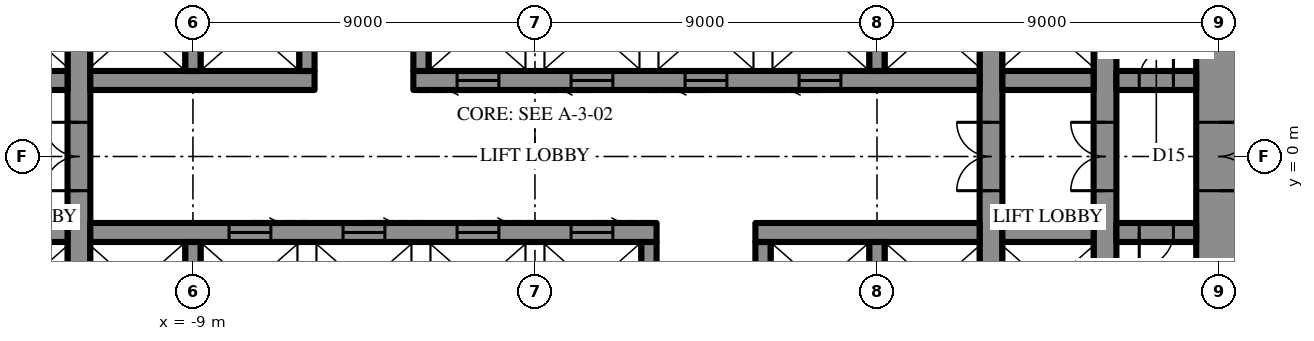
"""IFC4 building model, lengths in metres.
Left out: names, types, materials, properties, quantities, classifications, styles, units other than length and angle.
Written with IfcOpenShell. Run it as: python <this file> out.ifc"""

import sys

from ifc_helpers import new_model, si_unit, direction, frame, frame_2d, origin, place, context, subcontext, project, spatial, rectangle, extrude, element, fill, save


model = new_model("IFC4")
c1 = context("Model", 3, precision=1e-05, world=origin(), true_north=direction((0.0, 1.0)))
c2 = subcontext(c1, "Body", "Model", "MODEL_VIEW")
j1 = project(units=[si_unit("LENGTHUNIT", "METRE"), si_unit("PLANEANGLEUNIT", "RADIAN")], contexts=[c1])
p1 = place(None, origin())
s1 = spatial("IfcSite", under=j1, at=p1, CompositionType="ELEMENT")
p2 = place(p1, origin())
s2 = spatial("IfcBuilding", under=s1, at=p2, CompositionType="ELEMENT")
p3 = place(p2, frame((0.0, 0.0, 132.1)))
s3 = spatial("IfcBuildingStorey", under=s2, at=p3, CompositionType="ELEMENT", Elevation=132.1)
p4 = place(p3, frame((18.0, -10.7, 0.0), z_axis=(0.0, 0.0, 1.0), x_axis=(0.0, 1.0, 0.0)))
e1 = element("IfcWall", 1, at=p4, inside=s3, PredefinedType="SHEAR", context=c2, shape_type="SweptSolid", body=[
    extrude(rectangle(XDim=21.4, YDim=1.2, at=frame_2d((10.7, 0.0))), origin(), (0.0, 0.0, 1.0), 4.2),
])
p5 = place(p4, frame((9.8, 0.0, 0.0)))
e2 = element("IfcOpeningElement", 2, at=p5, cuts=e1, PredefinedType="OPENING", context=c2, shape_type="SweptSolid", body=[
    extrude(rectangle(XDim=1.8, YDim=2.4, at=frame_2d((0.9, 1.2))), frame((0.0, 0.61, 0.0), z_axis=(0.0, -1.0, 0.0), x_axis=(1.0, 0.0, 0.0)), (0.0, 0.0, 1.0), 1.22),
])
p6 = place(p3, frame((12.0, -10.7, 0.0), z_axis=(0.0, 0.0, 1.0), x_axis=(0.0, 1.0, 0.0)))
e3 = element("IfcWall", 3, at=p6, inside=s3, PredefinedType="SHEAR", context=c2, shape_type="SweptSolid", body=[
    extrude(rectangle(XDim=21.4, YDim=0.6, at=frame_2d((10.7, 0.0))), origin(), (0.0, 0.0, 1.0), 4.2),
])
p7 = place(p6, frame((9.8, 0.0, 0.0)))
e4 = element("IfcOpeningElement", 4, at=p7, cuts=e3, PredefinedType="OPENING", context=c2, shape_type="SweptSolid", body=[
    extrude(rectangle(XDim=1.8, YDim=2.4, at=frame_2d((0.9, 1.2))), frame((0.0, 0.31, 0.0), z_axis=(0.0, -1.0, 0.0), x_axis=(1.0, 0.0, 0.0)), (0.0, 0.0, 1.0), 0.62),
])
p8 = place(p3, frame((-12.0, -10.7, 0.0), z_axis=(0.0, 0.0, 1.0), x_axis=(0.0, 1.0, 0.0)))
e5 = element("IfcWall", 5, at=p8, inside=s3, PredefinedType="SHEAR", context=c2, shape_type="SweptSolid", body=[
    extrude(rectangle(XDim=21.4, YDim=0.6, at=frame_2d((10.7, 0.0))), origin(), (0.0, 0.0, 1.0), 4.2),
])
p9 = place(p8, frame((9.8, 0.0, 0.0)))
e6 = element("IfcOpeningElement", 6, at=p9, cuts=e5, PredefinedType="OPENING", context=c2, shape_type="SweptSolid", body=[
    extrude(rectangle(XDim=1.8, YDim=2.4, at=frame_2d((0.9, 1.2))), frame((0.0, 0.31, 0.0), z_axis=(0.0, -1.0, 0.0), x_axis=(1.0, 0.0, 0.0)), (0.0, 0.0, 1.0), 0.62),
])
p10 = place(p3, frame((15.0, -10.7, 0.0), z_axis=(0.0, 0.0, 1.0), x_axis=(0.0, 1.0, 0.0)))
e7 = element("IfcWall", 7, at=p10, inside=s3, PredefinedType="SHEAR", context=c2, shape_type="SweptSolid", body=[
    extrude(rectangle(XDim=21.4, YDim=0.6, at=frame_2d((10.7, 0.0))), origin(), (0.0, 0.0, 1.0), 4.2),
])
p11 = place(p10, frame((9.8, 0.0, 0.0)))
e8 = element("IfcOpeningElement", 8, at=p11, cuts=e7, PredefinedType="OPENING", context=c2, shape_type="SweptSolid", body=[
    extrude(rectangle(XDim=1.8, YDim=2.4, at=frame_2d((0.9, 1.2))), frame((0.0, 0.31, 0.0), z_axis=(0.0, -1.0, 0.0), x_axis=(1.0, 0.0, 0.0)), (0.0, 0.0, 1.0), 0.62),
])
p12 = place(p3, frame((-14.7, 2.0, 0.0), z_axis=(0.0, 0.0, 1.0), x_axis=(1.0, 0.0, 0.0)))
e9 = element("IfcWall", 9, at=p12, inside=s3, PredefinedType="SHEAR", context=c2, shape_type="SweptSolid", body=[
    extrude(rectangle(XDim=2.4, YDim=0.5, at=frame_2d((1.2, 0.0))), origin(), (0.0, 0.0, 1.0), 4.2),
])
p13 = place(p3, frame((-11.7, 2.0, 0.0), z_axis=(0.0, 0.0, 1.0), x_axis=(1.0, 0.0, 0.0)))
e10 = element("IfcWall", 10, at=p13, inside=s3, PredefinedType="SHEAR", context=c2, shape_type="SweptSolid", body=[
    extrude(rectangle(XDim=5.9, YDim=0.5, at=frame_2d((2.95, 0.0))), origin(), (0.0, 0.0, 1.0), 4.2),
])
p14 = place(p3, frame((-3.2, 2.0, 0.0), z_axis=(0.0, 0.0, 1.0), x_axis=(1.0, 0.0, 0.0)))
e11 = element("IfcWall", 11, at=p14, inside=s3, PredefinedType="SHEAR", context=c2, shape_type="SweptSolid", body=[
    extrude(rectangle(XDim=14.9, YDim=0.5, at=frame_2d((7.45, 0.0))), origin(), (0.0, 0.0, 1.0), 4.2),
])
p15 = place(p14, frame((1.15, 0.0, 0.0)))
e12 = element("IfcOpeningElement", 12, at=p15, cuts=e11, PredefinedType="OPENING", context=c2, shape_type="SweptSolid", body=[
    extrude(rectangle(XDim=1.1, YDim=2.2, at=frame_2d((0.55, 1.1))), frame((0.0, 0.26, 0.0), z_axis=(0.0, -1.0, 0.0), x_axis=(1.0, 0.0, 0.0)), (0.0, 0.0, 1.0), 0.52),
])
p16 = place(p14, frame((4.15, 0.0, 0.0)))
e13 = element("IfcOpeningElement", 13, at=p16, cuts=e11, PredefinedType="OPENING", context=c2, shape_type="SweptSolid", body=[
    extrude(rectangle(XDim=1.1, YDim=2.2, at=frame_2d((0.55, 1.1))), frame((0.0, 0.26, 0.0), z_axis=(0.0, -1.0, 0.0), x_axis=(1.0, 0.0, 0.0)), (0.0, 0.0, 1.0), 0.52),
])
p17 = place(p14, frame((7.15, 0.0, 0.0)))
e14 = element("IfcOpeningElement", 14, at=p17, cuts=e11, PredefinedType="OPENING", context=c2, shape_type="SweptSolid", body=[
    extrude(rectangle(XDim=1.1, YDim=2.2, at=frame_2d((0.55, 1.1))), frame((0.0, 0.26, 0.0), z_axis=(0.0, -1.0, 0.0), x_axis=(1.0, 0.0, 0.0)), (0.0, 0.0, 1.0), 0.52),
])
p18 = place(p14, frame((10.15, 0.0, 0.0)))
e15 = element("IfcOpeningElement", 15, at=p18, cuts=e11, PredefinedType="OPENING", context=c2, shape_type="SweptSolid", body=[
    extrude(rectangle(XDim=1.1, YDim=2.2, at=frame_2d((0.55, 1.1))), frame((0.0, 0.26, 0.0), z_axis=(0.0, -1.0, 0.0), x_axis=(1.0, 0.0, 0.0)), (0.0, 0.0, 1.0), 0.52),
])
p19 = place(p3, frame((12.3, 2.0, 0.0), z_axis=(0.0, 0.0, 1.0), x_axis=(1.0, 0.0, 0.0)))
e16 = element("IfcWall", 16, at=p19, inside=s3, PredefinedType="SHEAR", context=c2, shape_type="SweptSolid", body=[
    extrude(rectangle(XDim=2.4, YDim=0.5, at=frame_2d((1.2, 0.0))), origin(), (0.0, 0.0, 1.0), 4.2),
])
p20 = place(p3, frame((15.3, 2.0, 0.0), z_axis=(0.0, 0.0, 1.0), x_axis=(1.0, 0.0, 0.0)))
e17 = element("IfcWall", 17, at=p20, inside=s3, PredefinedType="SHEAR", context=c2, shape_type="SweptSolid", body=[
    extrude(rectangle(XDim=2.1, YDim=0.5, at=frame_2d((1.05, 0.0))), origin(), (0.0, 0.0, 1.0), 4.2),
])
p21 = place(p20, frame((0.6, 0.0, 0.0)))
e18 = element("IfcOpeningElement", 18, at=p21, cuts=e17, PredefinedType="OPENING", context=c2, shape_type="SweptSolid", body=[
    extrude(rectangle(XDim=0.9, YDim=2.2, at=frame_2d((0.45, 1.1))), frame((0.0, 0.26, 0.0), z_axis=(0.0, -1.0, 0.0), x_axis=(1.0, 0.0, 0.0)), (0.0, 0.0, 1.0), 0.52),
])
for number, where, z_axis, x_axis in (
    (19, (-9.0, 2.25, 0.0), (0.0, 0.0, 1.0), (0.0, 1.0, 0.0)),
    (20, (-6.0, 2.25, 0.0), (0.0, 0.0, 1.0), (0.0, 1.0, 0.0)),
    (21, (-3.0, 2.25, 0.0), (0.0, 0.0, 1.0), (0.0, 1.0, 0.0)),
    (22, (9.0, 2.25, 0.0), (0.0, 0.0, 1.0), (0.0, 1.0, 0.0)),
):
    element("IfcWall", number, at=place(p3, frame(where, z_axis=z_axis, x_axis=x_axis)), inside=s3, PredefinedType="SHEAR", context=c2, shape_type="SweptSolid", body=[
        extrude(rectangle(XDim=2.3, YDim=0.4, at=frame_2d((1.15, 0.0))), origin(), (0.0, 0.0, 1.0), 4.2),
    ])
p22 = place(p3, frame((17.4, -2.0, 0.0), z_axis=(0.0, 0.0, 1.0), x_axis=(-1.0, 0.0, 0.0)))
e23 = element("IfcWall", 23, at=p22, inside=s3, PredefinedType="SHEAR", context=c2, shape_type="SweptSolid", body=[
    extrude(rectangle(XDim=2.1, YDim=0.5, at=frame_2d((1.05, 0.0))), origin(), (0.0, 0.0, 1.0), 4.2),
])
p23 = place(p22, frame((0.6, 0.0, 0.0)))
e24 = element("IfcOpeningElement", 24, at=p23, cuts=e23, PredefinedType="OPENING", context=c2, shape_type="SweptSolid", body=[
    extrude(rectangle(XDim=0.9, YDim=2.2, at=frame_2d((0.45, 1.1))), frame((0.0, 0.26, 0.0), z_axis=(0.0, -1.0, 0.0), x_axis=(1.0, 0.0, 0.0)), (0.0, 0.0, 1.0), 0.52),
])
p24 = place(p3, frame((14.7, -2.0, 0.0), z_axis=(0.0, 0.0, 1.0), x_axis=(-1.0, 0.0, 0.0)))
e25 = element("IfcWall", 25, at=p24, inside=s3, PredefinedType="SHEAR", context=c2, shape_type="SweptSolid", body=[
    extrude(rectangle(XDim=2.4, YDim=0.5, at=frame_2d((1.2, 0.0))), origin(), (0.0, 0.0, 1.0), 4.2),
])
p25 = place(p3, frame((11.7, -2.0, 0.0), z_axis=(0.0, 0.0, 1.0), x_axis=(-1.0, 0.0, 0.0)))
e26 = element("IfcWall", 26, at=p25, inside=s3, PredefinedType="SHEAR", context=c2, shape_type="SweptSolid", body=[
    extrude(rectangle(XDim=5.9, YDim=0.5, at=frame_2d((2.95, 0.0))), origin(), (0.0, 0.0, 1.0), 4.2),
])
p26 = place(p3, frame((3.2, -2.0, 0.0), z_axis=(0.0, 0.0, 1.0), x_axis=(-1.0, 0.0, 0.0)))
e27 = element("IfcWall", 27, at=p26, inside=s3, PredefinedType="SHEAR", context=c2, shape_type="SweptSolid", body=[
    extrude(rectangle(XDim=14.9, YDim=0.5, at=frame_2d((7.45, 0.0))), origin(), (0.0, 0.0, 1.0), 4.2),
])
p27 = place(p26, frame((1.15, 0.0, 0.0)))
e28 = element("IfcOpeningElement", 28, at=p27, cuts=e27, PredefinedType="OPENING", context=c2, shape_type="SweptSolid", body=[
    extrude(rectangle(XDim=1.1, YDim=2.2, at=frame_2d((0.55, 1.1))), frame((0.0, 0.26, 0.0), z_axis=(0.0, -1.0, 0.0), x_axis=(1.0, 0.0, 0.0)), (0.0, 0.0, 1.0), 0.52),
])
p28 = place(p26, frame((4.15, 0.0, 0.0)))
e29 = element("IfcOpeningElement", 29, at=p28, cuts=e27, PredefinedType="OPENING", context=c2, shape_type="SweptSolid", body=[
    extrude(rectangle(XDim=1.1, YDim=2.2, at=frame_2d((0.55, 1.1))), frame((0.0, 0.26, 0.0), z_axis=(0.0, -1.0, 0.0), x_axis=(1.0, 0.0, 0.0)), (0.0, 0.0, 1.0), 0.52),
])
p29 = place(p26, frame((7.15, 0.0, 0.0)))
e30 = element("IfcOpeningElement", 30, at=p29, cuts=e27, PredefinedType="OPENING", context=c2, shape_type="SweptSolid", body=[
    extrude(rectangle(XDim=1.1, YDim=2.2, at=frame_2d((0.55, 1.1))), frame((0.0, 0.26, 0.0), z_axis=(0.0, -1.0, 0.0), x_axis=(1.0, 0.0, 0.0)), (0.0, 0.0, 1.0), 0.52),
])
p30 = place(p26, frame((10.15, 0.0, 0.0)))
e31 = element("IfcOpeningElement", 31, at=p30, cuts=e27, PredefinedType="OPENING", context=c2, shape_type="SweptSolid", body=[
    extrude(rectangle(XDim=1.1, YDim=2.2, at=frame_2d((0.55, 1.1))), frame((0.0, 0.26, 0.0), z_axis=(0.0, -1.0, 0.0), x_axis=(1.0, 0.0, 0.0)), (0.0, 0.0, 1.0), 0.52),
])
p31 = place(p3, frame((-12.3, -2.0, 0.0), z_axis=(0.0, 0.0, 1.0), x_axis=(-1.0, 0.0, 0.0)))
e32 = element("IfcWall", 32, at=p31, inside=s3, PredefinedType="SHEAR", context=c2, shape_type="SweptSolid", body=[
    extrude(rectangle(XDim=2.4, YDim=0.5, at=frame_2d((1.2, 0.0))), origin(), (0.0, 0.0, 1.0), 4.2),
])
for number, where, z_axis, x_axis in (
    (33, (9.0, -2.25, 0.0), (0.0, 0.0, 1.0), (0.0, -1.0, 0.0)),
    (34, (6.0, -2.25, 0.0), (0.0, 0.0, 1.0), (0.0, -1.0, 0.0)),
    (35, (3.0, -2.25, 0.0), (0.0, 0.0, 1.0), (0.0, -1.0, 0.0)),
    (36, (-9.0, -2.25, 0.0), (0.0, 0.0, 1.0), (0.0, -1.0, 0.0)),
):
    element("IfcWall", number, at=place(p3, frame(where, z_axis=z_axis, x_axis=x_axis)), inside=s3, PredefinedType="SHEAR", context=c2, shape_type="SweptSolid", body=[
        extrude(rectangle(XDim=2.3, YDim=0.4, at=frame_2d((1.15, 0.0))), origin(), (0.0, 0.0, 1.0), 4.2),
    ])
p32 = place(p5, frame((1.8, 0.0, 0.0), z_axis=(0.0, 0.0, 1.0), x_axis=(-1.0, 0.0, 0.0)))
e37 = element("IfcDoor", 37, at=p32, inside=s3, OperationType="DOUBLE_DOOR_SINGLE_SWING", PredefinedType="DOOR", context=c2, shape_type="SweptSolid", body=[
    extrude(rectangle(XDim=1.8, YDim=2.4, at=frame_2d((0.9, 1.2))), frame((0.0, 0.025, 0.0), z_axis=(0.0, -1.0, 0.0), x_axis=(1.0, 0.0, 0.0)), (0.0, 0.0, 1.0), 0.05),
])
fill(e2, e37)
p33 = place(p21, origin())
e38 = element("IfcDoor", 38, at=p33, inside=s3, OperationType="SINGLE_SWING_LEFT", PredefinedType="DOOR", context=c2, shape_type="SweptSolid", body=[
    extrude(rectangle(XDim=0.9, YDim=2.2, at=frame_2d((0.45, 1.1))), frame((0.0, 0.025, 0.0), z_axis=(0.0, -1.0, 0.0), x_axis=(1.0, 0.0, 0.0)), (0.0, 0.0, 1.0), 0.05),
])
fill(e18, e38)
p34 = place(p23, origin())
e39 = element("IfcDoor", 39, at=p34, inside=s3, OperationType="SINGLE_SWING_LEFT", PredefinedType="DOOR", context=c2, shape_type="SweptSolid", body=[
    extrude(rectangle(XDim=0.9, YDim=2.2, at=frame_2d((0.45, 1.1))), frame((0.0, 0.025, 0.0), z_axis=(0.0, -1.0, 0.0), x_axis=(1.0, 0.0, 0.0)), (0.0, 0.0, 1.0), 0.05),
])
fill(e24, e39)
p35 = place(p7, origin())
e40 = element("IfcDoor", 40, at=p35, inside=s3, OperationType="DOUBLE_DOOR_SINGLE_SWING", PredefinedType="DOOR", context=c2, shape_type="SweptSolid", body=[
    extrude(rectangle(XDim=1.8, YDim=2.4, at=frame_2d((0.9, 1.2))), frame((0.0, 0.025, 0.0), z_axis=(0.0, -1.0, 0.0), x_axis=(1.0, 0.0, 0.0)), (0.0, 0.0, 1.0), 0.05),
])
fill(e4, e40)
p36 = place(p9, origin())
e41 = element("IfcDoor", 41, at=p36, inside=s3, OperationType="DOUBLE_DOOR_SINGLE_SWING", PredefinedType="DOOR", context=c2, shape_type="SweptSolid", body=[
    extrude(rectangle(XDim=1.8, YDim=2.4, at=frame_2d((0.9, 1.2))), frame((0.0, 0.025, 0.0), z_axis=(0.0, -1.0, 0.0), x_axis=(1.0, 0.0, 0.0)), (0.0, 0.0, 1.0), 0.05),
])
fill(e6, e41)
p37 = place(p11, origin())
e42 = element("IfcDoor", 42, at=p37, inside=s3, OperationType="DOUBLE_DOOR_SINGLE_SWING", PredefinedType="DOOR", context=c2, shape_type="SweptSolid", body=[
    extrude(rectangle(XDim=1.8, YDim=2.4, at=frame_2d((0.9, 1.2))), frame((0.0, 0.025, 0.0), z_axis=(0.0, -1.0, 0.0), x_axis=(1.0, 0.0, 0.0)), (0.0, 0.0, 1.0), 0.05),
])
fill(e8, e42)
p38 = place(p15, frame((1.1, 0.0, 0.0), z_axis=(0.0, 0.0, 1.0), x_axis=(-1.0, 0.0, 0.0)))
e43 = element("IfcDoor", 43, at=p38, inside=s3, OperationType="SLIDING_TO_LEFT", PredefinedType="DOOR", context=c2, shape_type="SweptSolid", body=[
    extrude(rectangle(XDim=1.1, YDim=2.2, at=frame_2d((0.55, 1.1))), frame((0.0, 0.025, 0.0), z_axis=(0.0, -1.0, 0.0), x_axis=(1.0, 0.0, 0.0)), (0.0, 0.0, 1.0), 0.05),
])
fill(e12, e43)
p39 = place(p16, frame((1.1, 0.0, 0.0), z_axis=(0.0, 0.0, 1.0), x_axis=(-1.0, 0.0, 0.0)))
e44 = element("IfcDoor", 44, at=p39, inside=s3, OperationType="SLIDING_TO_LEFT", PredefinedType="DOOR", context=c2, shape_type="SweptSolid", body=[
    extrude(rectangle(XDim=1.1, YDim=2.2, at=frame_2d((0.55, 1.1))), frame((0.0, 0.025, 0.0), z_axis=(0.0, -1.0, 0.0), x_axis=(1.0, 0.0, 0.0)), (0.0, 0.0, 1.0), 0.05),
])
fill(e13, e44)
p40 = place(p17, frame((1.1, 0.0, 0.0), z_axis=(0.0, 0.0, 1.0), x_axis=(-1.0, 0.0, 0.0)))
e45 = element("IfcDoor", 45, at=p40, inside=s3, OperationType="SLIDING_TO_LEFT", PredefinedType="DOOR", context=c2, shape_type="SweptSolid", body=[
    extrude(rectangle(XDim=1.1, YDim=2.2, at=frame_2d((0.55, 1.1))), frame((0.0, 0.025, 0.0), z_axis=(0.0, -1.0, 0.0), x_axis=(1.0, 0.0, 0.0)), (0.0, 0.0, 1.0), 0.05),
])
fill(e14, e45)
p41 = place(p18, frame((1.1, 0.0, 0.0), z_axis=(0.0, 0.0, 1.0), x_axis=(-1.0, 0.0, 0.0)))
e46 = element("IfcDoor", 46, at=p41, inside=s3, OperationType="SLIDING_TO_LEFT", PredefinedType="DOOR", context=c2, shape_type="SweptSolid", body=[
    extrude(rectangle(XDim=1.1, YDim=2.2, at=frame_2d((0.55, 1.1))), frame((0.0, 0.025, 0.0), z_axis=(0.0, -1.0, 0.0), x_axis=(1.0, 0.0, 0.0)), (0.0, 0.0, 1.0), 0.05),
])
fill(e15, e46)
p42 = place(p27, frame((1.1, 0.0, 0.0), z_axis=(0.0, 0.0, 1.0), x_axis=(-1.0, 0.0, 0.0)))
e47 = element("IfcDoor", 47, at=p42, inside=s3, OperationType="SLIDING_TO_LEFT", PredefinedType="DOOR", context=c2, shape_type="SweptSolid", body=[
    extrude(rectangle(XDim=1.1, YDim=2.2, at=frame_2d((0.55, 1.1))), frame((0.0, 0.025, 0.0), z_axis=(0.0, -1.0, 0.0), x_axis=(1.0, 0.0, 0.0)), (0.0, 0.0, 1.0), 0.05),
])
fill(e28, e47)
p43 = place(p28, frame((1.1, 0.0, 0.0), z_axis=(0.0, 0.0, 1.0), x_axis=(-1.0, 0.0, 0.0)))
e48 = element("IfcDoor", 48, at=p43, inside=s3, OperationType="SLIDING_TO_LEFT", PredefinedType="DOOR", context=c2, shape_type="SweptSolid", body=[
    extrude(rectangle(XDim=1.1, YDim=2.2, at=frame_2d((0.55, 1.1))), frame((0.0, 0.025, 0.0), z_axis=(0.0, -1.0, 0.0), x_axis=(1.0, 0.0, 0.0)), (0.0, 0.0, 1.0), 0.05),
])
fill(e29, e48)
p44 = place(p29, frame((1.1, 0.0, 0.0), z_axis=(0.0, 0.0, 1.0), x_axis=(-1.0, 0.0, 0.0)))
e49 = element("IfcDoor", 49, at=p44, inside=s3, OperationType="SLIDING_TO_LEFT", PredefinedType="DOOR", context=c2, shape_type="SweptSolid", body=[
    extrude(rectangle(XDim=1.1, YDim=2.2, at=frame_2d((0.55, 1.1))), frame((0.0, 0.025, 0.0), z_axis=(0.0, -1.0, 0.0), x_axis=(1.0, 0.0, 0.0)), (0.0, 0.0, 1.0), 0.05),
])
fill(e30, e49)
p45 = place(p30, frame((1.1, 0.0, 0.0), z_axis=(0.0, 0.0, 1.0), x_axis=(-1.0, 0.0, 0.0)))
e50 = element("IfcDoor", 50, at=p45, inside=s3, OperationType="SLIDING_TO_LEFT", PredefinedType="DOOR", context=c2, shape_type="SweptSolid", body=[
    extrude(rectangle(XDim=1.1, YDim=2.2, at=frame_2d((0.55, 1.1))), frame((0.0, 0.025, 0.0), z_axis=(0.0, -1.0, 0.0), x_axis=(1.0, 0.0, 0.0)), (0.0, 0.0, 1.0), 0.05),
])
fill(e31, e50)
save(model, sys.argv[1])
